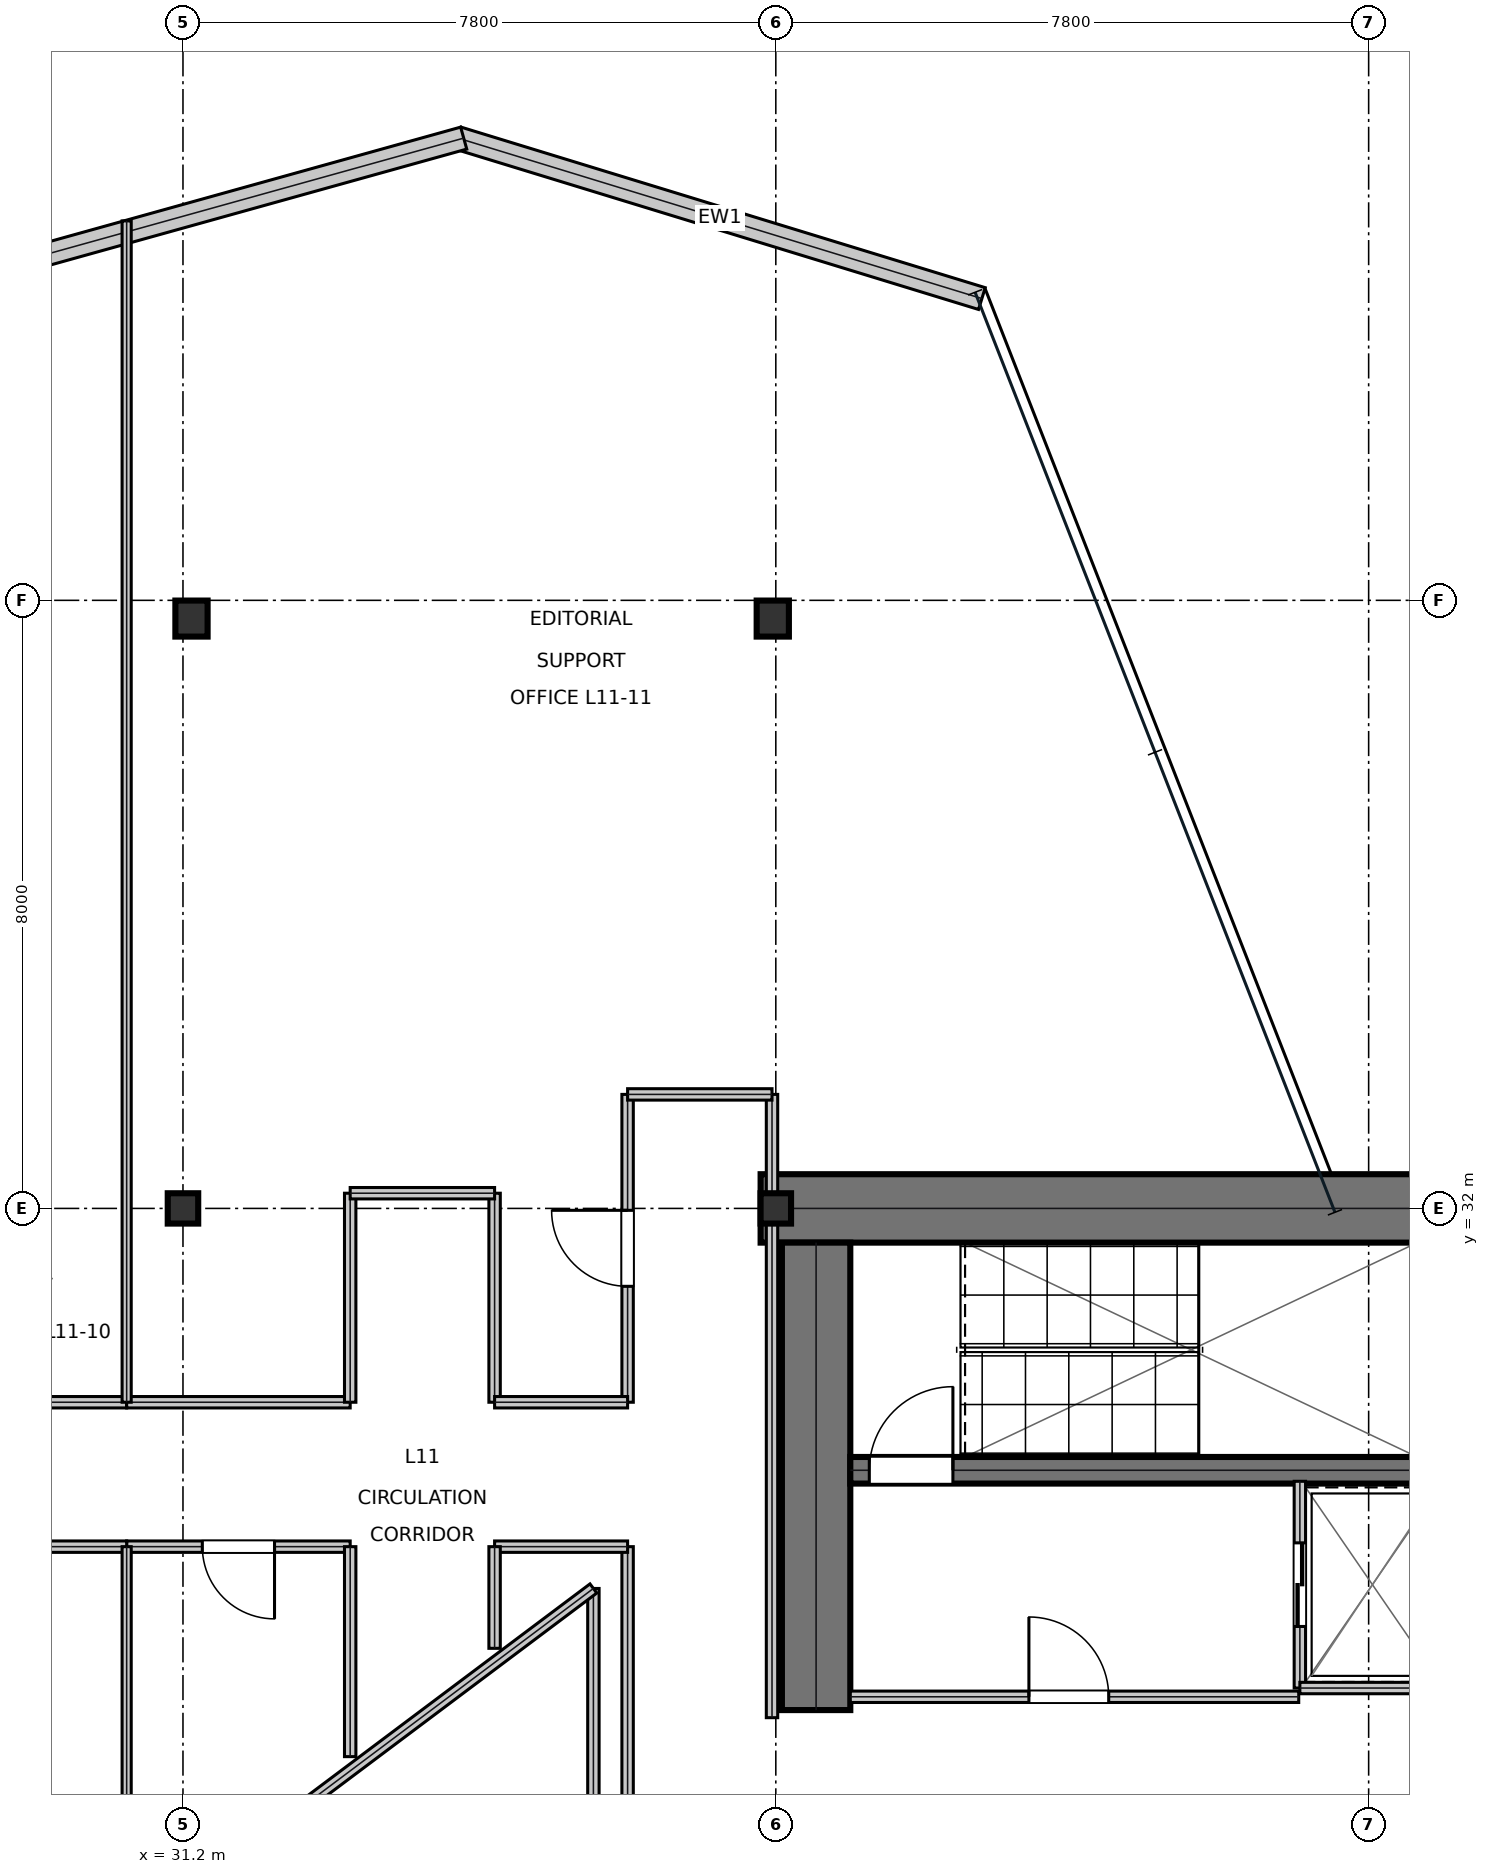
"""IFC4 building model, lengths in metres.
Left out: names, types, materials, properties, quantities, classifications, styles, units other than length and angle.
Written with IfcOpenShell. Run it as: python <this file> out.ifc"""

import sys

from ifc_helpers import new_model, si_unit, direction, frame, frame_2d, origin, origin_2d, place, context, subcontext, project, spatial, rectangle, i_section, extrude, element, fill, save


model = new_model("IFC4")
c1 = context("Model", 3, precision=1e-05, world=origin(), true_north=direction((0.0, 1.0)))
c2 = subcontext(c1, "Body", "Model", "MODEL_VIEW")
j1 = project(units=[si_unit("LENGTHUNIT", "METRE"), si_unit("PLANEANGLEUNIT", "RADIAN")], contexts=[c1])
p1 = place(None, origin())
s1 = spatial("IfcSite", under=j1, at=p1, CompositionType="ELEMENT")
p2 = place(p1, origin())
s2 = spatial("IfcBuilding", under=s1, at=p2, CompositionType="ELEMENT")
p3 = place(p2, frame((0.0, 0.0, 54.0)))
s3 = spatial("IfcBuildingStorey", under=s2, at=p3, CompositionType="ELEMENT", Elevation=54.0)
p4 = place(p3, frame((38.8, 32.0, 0.0), z_axis=(0.0, 0.0, 1.0), x_axis=(1.0, 0.0, 0.0)))
e1 = element("IfcWall", 1, at=p4, inside=s3, PredefinedType="SHEAR", context=c2, shape_type="SweptSolid", body=[
    extrude(rectangle(XDim=16.0, YDim=0.9, at=frame_2d((8.0, 0.0))), origin(), (0.0, 0.0, 1.0), 3.81),
])
p5 = place(p3, frame((39.53, 25.4, 0.0), z_axis=(0.0, 0.0, 1.0), x_axis=(0.0, 1.0, 0.0)))
e2 = element("IfcWall", 2, at=p5, inside=s3, PredefinedType="SHEAR", context=c2, shape_type="SweptSolid", body=[
    extrude(rectangle(XDim=6.15, YDim=0.9, at=frame_2d((3.075, 0.0))), origin(), (0.0, 0.0, 1.0), 3.81),
])
p6 = place(p3, frame((39.98, 28.555, 0.0), z_axis=(0.0, 0.0, 1.0), x_axis=(1.0, 0.0, 0.0)))
e3 = element("IfcWall", 3, at=p6, inside=s3, PredefinedType="SHEAR", context=c2, shape_type="SweptSolid", body=[
    extrude(rectangle(XDim=7.71, YDim=0.35, at=frame_2d((3.855, 0.0))), origin(), (0.0, 0.0, 1.0), 3.81),
])
p7 = place(p6, frame((0.25, 0.0, 0.0)))
e4 = element("IfcOpeningElement", 4, at=p7, cuts=e3, PredefinedType="OPENING", context=c2, shape_type="SweptSolid", body=[
    extrude(rectangle(XDim=1.1, YDim=2.15, at=frame_2d((0.55, 1.075))), frame((0.0, 0.185, 0.0), z_axis=(0.0, -1.0, 0.0), x_axis=(1.0, 0.0, 0.0)), (0.0, 0.0, 1.0), 0.37),
])
for number, where, z_axis, x_axis in (
    (5, (31.2, 32.0, 0.0), (0.0, 0.0, 1.0), (1.0, 0.0, 0.0)),
    (6, (39.0, 32.0, 0.0), (0.0, 0.0, 1.0), (1.0, 0.0, 0.0)),
):
    element("IfcColumn", number, at=place(p3, frame(where, z_axis=z_axis, x_axis=x_axis)), inside=s3, PredefinedType="COLUMN", context=c2, shape_type="SweptSolid", body=[
        extrude(i_section(OverallWidth=0.401, OverallDepth=0.399, WebThickness=0.025, FlangeThickness=0.04, at=origin_2d()), origin(), (0.0, 0.0, 1.0), 4.044),
    ])
for number, where, z_axis, x_axis in (
    (7, (31.312, 39.76, 0.016), (0.0, 0.0, 1.0), (1.0, 0.0, 0.0)),
    (8, (38.96, 39.76, 0.016), (0.0, 0.0, 1.0), (1.0, 0.0, 0.0)),
):
    element("IfcColumn", number, at=place(p3, frame(where, z_axis=z_axis, x_axis=x_axis)), inside=s3, PredefinedType="COLUMN", context=c2, shape_type="SweptSolid", body=[
        extrude(i_section(OverallWidth=0.424, OverallDepth=0.474, WebThickness=0.048, FlangeThickness=0.077, at=origin_2d()), origin(), (0.0, 0.0, 1.0), 4.018),
    ])
p8 = place(p3, frame((41.711, 43.97, 0.0), z_axis=(0.0, 0.0, 1.0), x_axis=(-0.956174816369, 0.292796380685, 0.0)))
e9 = element("IfcWall", 9, at=p8, inside=s3, PredefinedType="STANDARD", context=c2, shape_type="SweptSolid", body=[
    extrude(rectangle(XDim=7.213, YDim=0.3, at=frame_2d((3.606, 0.0))), origin(), (0.0, 0.0, 1.0), 3.81),
])
p9 = place(p3, frame((34.894, 46.081, 0.0), z_axis=(0.0, 0.0, 1.0), x_axis=(-0.963365312104, -0.268192608836, 0.0)))
e10 = element("IfcWall", 10, at=p9, inside=s3, PredefinedType="STANDARD", context=c2, shape_type="SweptSolid", body=[
    extrude(rectangle(XDim=7.159, YDim=0.3, at=frame_2d((3.579, 0.0))), origin(), (0.0, 0.0, 1.0), 3.81),
])
p10 = place(p3, frame((39.98, 25.575, 0.0), z_axis=(0.0, 0.0, 1.0), x_axis=(1.0, 0.0, 0.0)))
e11 = element("IfcWall", 11, at=p10, inside=s3, PredefinedType="PARTITIONING", context=c2, shape_type="SweptSolid", body=[
    extrude(rectangle(XDim=5.9, YDim=0.15, at=frame_2d((2.95, 0.0))), origin(), (0.0, 0.0, 1.0), 3.81),
])
p11 = place(p10, frame((2.35, 0.0, 0.0)))
e12 = element("IfcOpeningElement", 12, at=p11, cuts=e11, PredefinedType="OPENING", context=c2, shape_type="SweptSolid", body=[
    extrude(rectangle(XDim=1.05, YDim=2.15, at=frame_2d((0.525, 1.075))), frame((0.0, 0.085, 0.0), z_axis=(0.0, -1.0, 0.0), x_axis=(1.0, 0.0, 0.0)), (0.0, 0.0, 1.0), 0.17),
])
p12 = place(p3, frame((45.895, 25.69, 0.0), z_axis=(0.0, 0.0, 1.0), x_axis=(0.0, 1.0, 0.0)))
e13 = element("IfcWall", 13, at=p12, inside=s3, PredefinedType="PARTITIONING", context=c2, shape_type="SweptSolid", body=[
    extrude(rectangle(XDim=2.72, YDim=0.15, at=frame_2d((1.36, 0.0))), origin(), (0.0, 0.0, 1.0), 3.81),
])
p13 = place(p12, frame((0.81, 0.0, 0.0)))
e14 = element("IfcOpeningElement", 14, at=p13, cuts=e13, PredefinedType="OPENING", context=c2, shape_type="SweptSolid", body=[
    extrude(rectangle(XDim=1.1, YDim=2.15, at=frame_2d((0.55, 1.075))), frame((0.0, 0.085, 0.0), z_axis=(0.0, -1.0, 0.0), x_axis=(1.0, 0.0, 0.0)), (0.0, 0.0, 1.0), 0.17),
])
p14 = place(p3, frame((45.895, 25.69, 0.0), z_axis=(0.0, 0.0, 1.0), x_axis=(1.0, 0.0, 0.0)))
e15 = element("IfcWall", 15, at=p14, inside=s3, PredefinedType="PARTITIONING", context=c2, shape_type="SweptSolid", body=[
    extrude(rectangle(XDim=1.915, YDim=0.15, at=frame_2d((0.958, 0.0))), origin(), (0.0, 0.0, 1.0), 3.81),
])
p15 = place(p3, frame((37.05, 14.5, 0.0), z_axis=(0.0, 0.0, 1.0), x_axis=(0.0, 1.0, 0.0)))
e16 = element("IfcWall", 16, at=p15, inside=s3, PredefinedType="PARTITIONING", context=c2, shape_type="SweptSolid", body=[
    extrude(rectangle(XDim=13.05, YDim=0.15, at=frame_2d((6.525, 0.0))), origin(), (0.0, 0.0, 1.0), 3.181),
])
p16 = place(p15, frame((4.585, 0.0, 0.0)))
e17 = element("IfcOpeningElement", 17, at=p16, cuts=e16, PredefinedType="OPENING", context=c2, shape_type="SweptSolid", body=[
    extrude(rectangle(XDim=1.0, YDim=2.15, at=frame_2d((0.5, 1.075))), frame((0.0, 0.085, 0.0), z_axis=(0.0, -1.0, 0.0), x_axis=(1.0, 0.0, 0.0)), (0.0, 0.0, 1.0), 0.17),
])
p17 = place(p3, frame((30.459, 27.55, 0.0), z_axis=(0.0, 0.0, 1.0), x_axis=(1.0, 0.0, 0.0)))
e18 = element("IfcWall", 18, at=p17, inside=s3, PredefinedType="PARTITIONING", context=c2, shape_type="SweptSolid", body=[
    extrude(rectangle(XDim=2.941, YDim=0.15, at=frame_2d((1.47, 0.0))), origin(), (0.0, 0.0, 1.0), 3.181),
])
p18 = place(p17, frame((0.996, 0.0, 0.0)))
e19 = element("IfcOpeningElement", 19, at=p18, cuts=e18, PredefinedType="OPENING", context=c2, shape_type="SweptSolid", body=[
    extrude(rectangle(XDim=0.95, YDim=2.15, at=frame_2d((0.475, 1.075))), frame((0.0, 0.085, 0.0), z_axis=(0.0, -1.0, 0.0), x_axis=(1.0, 0.0, 0.0)), (0.0, 0.0, 1.0), 0.17),
])
p19 = place(p3, frame((21.4, 27.55, 0.0), z_axis=(0.0, 0.0, 1.0), x_axis=(1.0, 0.0, 0.0)))
e20 = element("IfcWall", 20, at=p19, inside=s3, PredefinedType="PARTITIONING", context=c2, shape_type="SweptSolid", body=[
    extrude(rectangle(XDim=9.059, YDim=0.15, at=frame_2d((4.53, 0.0))), origin(), (0.0, 0.0, 1.0), 3.391),
])
p20 = place(p19, frame((4.03, 0.0, 0.0)))
e21 = element("IfcOpeningElement", 21, at=p20, cuts=e20, PredefinedType="OPENING", context=c2, shape_type="SweptSolid", body=[
    extrude(rectangle(XDim=1.0, YDim=2.15, at=frame_2d((0.5, 1.075))), frame((0.0, 0.085, 0.0), z_axis=(0.0, -1.0, 0.0), x_axis=(1.0, 0.0, 0.0)), (0.0, 0.0, 1.0), 0.17),
])
p21 = place(p3, frame((15.794, 29.45, 0.0), z_axis=(0.0, 0.0, 1.0), x_axis=(1.0, 0.0, 0.0)))
e22 = element("IfcWall", 22, at=p21, inside=s3, PredefinedType="PARTITIONING", context=c2, shape_type="SweptSolid", body=[
    extrude(rectangle(XDim=14.665, YDim=0.15, at=frame_2d((7.333, 0.0))), origin(), (0.0, 0.0, 1.0), 3.338),
])
p22 = place(p21, frame((10.433, 0.0, 0.0)))
e23 = element("IfcOpeningElement", 23, at=p22, cuts=e22, PredefinedType="OPENING", context=c2, shape_type="SweptSolid", body=[
    extrude(rectangle(XDim=1.0, YDim=2.15, at=frame_2d((0.5, 1.075))), frame((0.0, 0.085, 0.0), z_axis=(0.0, -1.0, 0.0), x_axis=(1.0, 0.0, 0.0)), (0.0, 0.0, 1.0), 0.17),
])
p23 = place(p3, frame((37.05, 29.45, 0.0), z_axis=(0.0, 0.0, 1.0), x_axis=(0.0, 1.0, 0.0)))
e24 = element("IfcWall", 24, at=p23, inside=s3, PredefinedType="PARTITIONING", context=c2, shape_type="SweptSolid", body=[
    extrude(rectangle(XDim=4.05, YDim=0.15, at=frame_2d((2.025, 0.0))), origin(), (0.0, 0.0, 1.0), 3.181),
])
p24 = place(p23, frame((1.525, 0.0, 0.0)))
e25 = element("IfcOpeningElement", 25, at=p24, cuts=e24, PredefinedType="OPENING", context=c2, shape_type="SweptSolid", body=[
    extrude(rectangle(XDim=1.0, YDim=2.15, at=frame_2d((0.5, 1.075))), frame((0.0, 0.085, 0.0), z_axis=(0.0, -1.0, 0.0), x_axis=(1.0, 0.0, 0.0)), (0.0, 0.0, 1.0), 0.17),
])
p25 = place(p3, frame((35.3, 27.55, 0.0), z_axis=(0.0, 0.0, 1.0), x_axis=(1.0, 0.0, 0.0)))
e26 = element("IfcWall", 26, at=p25, inside=s3, PredefinedType="PARTITIONING", context=c2, shape_type="SweptSolid", body=[
    extrude(rectangle(XDim=1.75, YDim=0.15, at=frame_2d((0.875, 0.0))), origin(), (0.0, 0.0, 1.0), 3.391),
])
p26 = place(p3, frame((35.3, 26.212, 0.0), z_axis=(0.0, 0.0, 1.0), x_axis=(0.0, 1.0, 0.0)))
e27 = element("IfcWall", 27, at=p26, inside=s3, PredefinedType="PARTITIONING", context=c2, shape_type="SweptSolid", body=[
    extrude(rectangle(XDim=1.338, YDim=0.15, at=frame_2d((0.669, 0.0))), origin(), (0.0, 0.0, 1.0), 3.81),
])
p27 = place(p3, frame((33.4, 24.788, 0.0), z_axis=(0.0, 0.0, 1.0), x_axis=(0.0, 1.0, 0.0)))
e28 = element("IfcWall", 28, at=p27, inside=s3, PredefinedType="PARTITIONING", context=c2, shape_type="SweptSolid", body=[
    extrude(rectangle(XDim=2.762, YDim=0.15, at=frame_2d((1.381, 0.0))), origin(), (0.0, 0.0, 1.0), 3.81),
])
p28 = place(p3, frame((38.95, 25.3, 0.0), z_axis=(0.0, 0.0, 1.0), x_axis=(0.0, 1.0, 0.0)))
e29 = element("IfcWall", 29, at=p28, inside=s3, PredefinedType="PARTITIONING", context=c2, shape_type="SweptSolid", body=[
    extrude(rectangle(XDim=8.2, YDim=0.15, at=frame_2d((4.1, 0.0))), origin(), (0.0, 0.0, 1.0), 3.181),
])
p29 = place(p3, frame((30.459, 29.45, 0.0), z_axis=(0.0, 0.0, 1.0), x_axis=(1.0, 0.0, 0.0)))
e30 = element("IfcWall", 30, at=p29, inside=s3, PredefinedType="PARTITIONING", context=c2, shape_type="SweptSolid", body=[
    extrude(rectangle(XDim=2.941, YDim=0.15, at=frame_2d((1.47, 0.0))), origin(), (0.0, 0.0, 1.0), 3.181),
])
for number, where, z_axis, x_axis in (
    (31, (33.4, 29.45, 0.0), (0.0, 0.0, 1.0), (0.0, 1.0, 0.0)),
    (32, (35.3, 29.45, 0.0), (0.0, 0.0, 1.0), (0.0, 1.0, 0.0)),
):
    element("IfcWall", number, at=place(p3, frame(where, z_axis=z_axis, x_axis=x_axis)), inside=s3, PredefinedType="PARTITIONING", context=c2, shape_type="SweptSolid", body=[
        extrude(rectangle(XDim=2.75, YDim=0.15, at=frame_2d((1.375, 0.0))), origin(), (0.0, 0.0, 1.0), 3.181),
    ])
p30 = place(p3, frame((37.05, 33.5, 0.0), z_axis=(0.0, 0.0, 1.0), x_axis=(1.0, 0.0, 0.0)))
e33 = element("IfcWall", 33, at=p30, inside=s3, PredefinedType="PARTITIONING", context=c2, shape_type="SweptSolid", body=[
    extrude(rectangle(XDim=1.9, YDim=0.15, at=frame_2d((0.95, 0.0))), origin(), (0.0, 0.0, 1.0), 3.81),
])
p31 = place(p3, frame((33.4, 32.2, 0.0), z_axis=(0.0, 0.0, 1.0), x_axis=(1.0, 0.0, 0.0)))
e34 = element("IfcWall", 34, at=p31, inside=s3, PredefinedType="PARTITIONING", context=c2, shape_type="SweptSolid", body=[
    extrude(rectangle(XDim=1.9, YDim=0.15, at=frame_2d((0.95, 0.0))), origin(), (0.0, 0.0, 1.0), 3.181),
])
p32 = place(p3, frame((35.3, 29.45, 0.0), z_axis=(0.0, 0.0, 1.0), x_axis=(1.0, 0.0, 0.0)))
e35 = element("IfcWall", 35, at=p32, inside=s3, PredefinedType="PARTITIONING", context=c2, shape_type="SweptSolid", body=[
    extrude(rectangle(XDim=1.75, YDim=0.15, at=frame_2d((0.875, 0.0))), origin(), (0.0, 0.0, 1.0), 3.81),
])
p33 = place(p3, frame((30.459, 23.111, 0.0), z_axis=(0.0, 0.0, 1.0), x_axis=(0.0, 1.0, 0.0)))
e36 = element("IfcWall", 36, at=p33, inside=s3, PredefinedType="PARTITIONING", context=c2, shape_type="SweptSolid", body=[
    extrude(rectangle(XDim=4.439, YDim=0.12, at=frame_2d((2.219, 0.0))), origin(), (0.0, 0.0, 1.0), 3.181),
])
p34 = place(p3, frame((30.459, 29.45, 0.0), z_axis=(0.0, 0.0, 1.0), x_axis=(0.0, 1.0, 0.0)))
e37 = element("IfcWall", 37, at=p34, inside=s3, PredefinedType="PARTITIONING", context=c2, shape_type="SweptSolid", body=[
    extrude(rectangle(XDim=15.542, YDim=0.12, at=frame_2d((7.771, 0.0))), origin(), (0.0, 0.0, 1.0), 3.338),
])
p35 = place(p3, frame((36.6, 21.0, 0.0), z_axis=(0.0, 0.0, 1.0), x_axis=(0.0, 1.0, 0.0)))
e38 = element("IfcWall", 38, at=p35, inside=s3, PredefinedType="MOVABLE", context=c2, shape_type="SweptSolid", body=[
    extrude(rectangle(XDim=6.0, YDim=0.15, at=frame_2d((3.0, 0.0))), origin(), (0.0, 0.0, 1.0), 3.81),
])
p36 = place(p3, frame((36.6, 27.0, 0.0), z_axis=(0.0, 0.0, 1.0), x_axis=(-0.8, -0.6, 0.0)))
e39 = element("IfcWall", 39, at=p36, inside=s3, PredefinedType="MOVABLE", context=c2, shape_type="SweptSolid", body=[
    extrude(rectangle(XDim=5.0, YDim=0.15, at=frame_2d((2.5, 0.0))), origin(), (0.0, 0.0, 1.0), 3.81),
])
p37 = place(p11, origin())
e40 = element("IfcDoor", 40, at=p37, inside=s3, OperationType="SINGLE_SWING_LEFT", PredefinedType="DOOR", context=c2, shape_type="SweptSolid", body=[
    extrude(rectangle(XDim=1.05, YDim=2.15, at=frame_2d((0.525, 1.075))), frame((0.0, 0.025, 0.0), z_axis=(0.0, -1.0, 0.0), x_axis=(1.0, 0.0, 0.0)), (0.0, 0.0, 1.0), 0.05),
])
fill(e12, e40)
p38 = place(p13, frame((1.1, 0.0, 0.0), z_axis=(0.0, 0.0, 1.0), x_axis=(-1.0, 0.0, 0.0)))
e41 = element("IfcDoor", 41, at=p38, inside=s3, OperationType="DOUBLE_DOOR_SLIDING", PredefinedType="DOOR", context=c2, shape_type="SweptSolid", body=[
    extrude(rectangle(XDim=1.1, YDim=2.15, at=frame_2d((0.55, 1.075))), frame((0.0, 0.025, 0.0), z_axis=(0.0, -1.0, 0.0), x_axis=(1.0, 0.0, 0.0)), (0.0, 0.0, 1.0), 0.05),
])
fill(e14, e41)
p39 = place(p18, frame((0.95, 0.0, 0.0), z_axis=(0.0, 0.0, 1.0), x_axis=(-1.0, 0.0, 0.0)))
e42 = element("IfcDoor", 42, at=p39, inside=s3, OperationType="SINGLE_SWING_LEFT", PredefinedType="DOOR", context=c2, shape_type="SweptSolid", body=[
    extrude(rectangle(XDim=0.95, YDim=2.15, at=frame_2d((0.475, 1.075))), frame((0.0, 0.025, 0.0), z_axis=(0.0, -1.0, 0.0), x_axis=(1.0, 0.0, 0.0)), (0.0, 0.0, 1.0), 0.05),
])
fill(e19, e42)
p40 = place(p24, origin())
e43 = element("IfcDoor", 43, at=p40, inside=s3, OperationType="SINGLE_SWING_RIGHT", PredefinedType="DOOR", context=c2, shape_type="SweptSolid", body=[
    extrude(rectangle(XDim=1.0, YDim=2.15, at=frame_2d((0.5, 1.075))), frame((0.0, 0.025, 0.0), z_axis=(0.0, -1.0, 0.0), x_axis=(1.0, 0.0, 0.0)), (0.0, 0.0, 1.0), 0.05),
])
fill(e25, e43)
p41 = place(p7, origin())
e44 = element("IfcDoor", 44, at=p41, inside=s3, OperationType="SINGLE_SWING_RIGHT", PredefinedType="DOOR", context=c2, shape_type="SweptSolid", body=[
    extrude(rectangle(XDim=1.1, YDim=2.15, at=frame_2d((0.55, 1.075))), frame((0.0, 0.025, 0.0), z_axis=(0.0, -1.0, 0.0), x_axis=(1.0, 0.0, 0.0)), (0.0, 0.0, 1.0), 0.05),
])
fill(e4, e44)
save(model, sys.argv[1])
